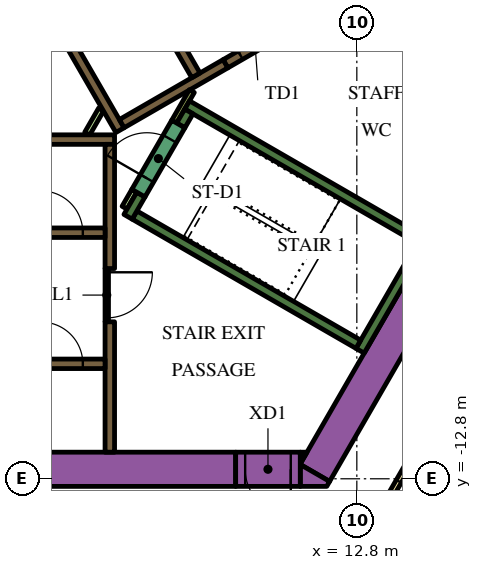
"""IFC4 building model, lengths in metres.
Left out: names, types, materials, properties, quantities, classifications, styles, units other than length and angle.
Written with IfcOpenShell. Run it as: python <this file> out.ifc"""

import sys

from ifc_helpers import new_model, si_unit, direction, frame, frame_2d, origin, place, context, subcontext, project, spatial, polyline, rectangle, outline, extrude, element, fill, save


model = new_model("IFC4")
c1 = context("Model", 3, precision=1e-05, world=origin(), true_north=direction((0.0, 1.0)))
c2 = subcontext(c1, "Body", "Model", "MODEL_VIEW")
j1 = project(units=[si_unit("LENGTHUNIT", "METRE"), si_unit("PLANEANGLEUNIT", "RADIAN")], contexts=[c1])
p1 = place(None, origin())
s1 = spatial("IfcSite", under=j1, at=p1, CompositionType="ELEMENT")
p2 = place(p1, origin())
s2 = spatial("IfcBuilding", under=s1, at=p2, CompositionType="ELEMENT")
p3 = place(p2, frame((0.0, 0.0, 39.3)))
s3 = spatial("IfcBuildingStorey", under=s2, at=p3, CompositionType="ELEMENT", Elevation=39.3)
p4 = place(p3, frame((6.711, 13.476, 0.0), z_axis=(0.0, 0.0, 1.0), x_axis=(0.500002723396, -0.866023831425, 0.0)))
e1 = element("IfcWall", 1, at=p4, inside=s3, PredefinedType="SOLIDWALL", context=c2, shape_type="SweptSolid", body=[
    extrude(rectangle(XDim=20.334, YDim=0.9, at=frame_2d((10.167, 0.0))), origin(), (0.0, 0.0, 1.0), 3.9),
])
p5 = place(p3, frame((11.695, -12.644, 0.0), z_axis=(0.0, 0.0, 1.0), x_axis=(0.500010229568, 0.86601949766, 0.0)))
e2 = element("IfcWall", 2, at=p5, inside=s3, PredefinedType="SOLIDWALL", context=c2, shape_type="SweptSolid", body=[
    extrude(rectangle(XDim=9.326, YDim=0.9, at=frame_2d((4.663, 0.0))), origin(), (0.0, 0.0, 1.0), 3.9),
])
p6 = place(p3, origin())
e3 = element("IfcWall", 3, at=p6, inside=s3, PredefinedType="SOLIDWALL", context=c2, shape_type="SweptSolid", body=[
    extrude(outline(polyline([(12.009, -13.0), (11.312, -13.0), (11.312, -12.425), (12.083, -12.871), (12.009, -13.0)])), origin(), (0.0, 0.0, 1.0), 3.9),
])
e4 = element("IfcWall", 4, at=p6, inside=s3, PredefinedType="SOLIDWALL", context=c2, shape_type="SweptSolid", body=[
    extrude(outline(polyline([(11.489, -12.1), (11.312, -12.407), (11.312, -12.1), (11.489, -12.1)])), origin(), (0.0, 0.0, 1.0), 3.9),
])
p7 = place(p3, frame((-12.019, -12.55, 0.0), z_axis=(0.0, 0.0, 1.0), x_axis=(1.0, 0.0, 0.0)))
e5 = element("IfcWall", 5, at=p7, inside=s3, PredefinedType="SOLIDWALL", context=c2, shape_type="SweptSolid", body=[
    extrude(rectangle(XDim=21.63, YDim=0.9, at=frame_2d((10.815, 0.0))), origin(), (0.0, 0.0, 1.0), 3.9),
])
p8 = place(p3, frame((12.885, -9.431, 0.0), z_axis=(0.0, 0.0, 1.0), x_axis=(0.500020560727, 0.866013532718, 0.0)))
e6 = element("IfcWall", 6, at=p8, inside=s3, PredefinedType="SOLIDWALL", context=c2, shape_type="SweptSolid", body=[
    extrude(rectangle(XDim=3.45, YDim=0.25, at=frame_2d((1.725, 0.0))), origin(), (0.0, 0.0, 1.0), 3.9),
])
p9 = place(p3, frame((12.84, -9.261, 0.0), z_axis=(0.0, 0.0, 1.0), x_axis=(-0.866013990052, 0.500019768644, 0.0)))
e7 = element("IfcWall", 7, at=p9, inside=s3, PredefinedType="SOLIDWALL", context=c2, shape_type="SweptSolid", body=[
    extrude(rectangle(XDim=6.8, YDim=0.25, at=frame_2d((3.4, 0.0))), origin(), (0.0, 0.0, 1.0), 3.9),
])
p10 = place(p3, frame((6.78, -5.906, 0.0), z_axis=(0.0, 0.0, 1.0), x_axis=(0.500223362819, 0.865896406789, 0.0)))
e8 = element("IfcWall", 8, at=p10, inside=s3, PredefinedType="SOLIDWALL", context=c2, shape_type="SweptSolid", body=[
    extrude(rectangle(XDim=0.675, YDim=0.25, at=frame_2d((0.337, 0.0))), origin(), (0.0, 0.0, 1.0), 3.9),
])
p11 = place(p3, frame((8.334, -2.964, 0.0), z_axis=(0.0, 0.0, 1.0), x_axis=(0.866016039709, -0.500016218704, 0.0)))
e9 = element("IfcWall", 9, at=p11, inside=s3, PredefinedType="SOLIDWALL", context=c2, shape_type="SweptSolid", body=[
    extrude(rectangle(XDim=7.05, YDim=0.25, at=frame_2d((3.525, 0.0))), origin(), (0.0, 0.0, 1.0), 3.9),
])
p12 = place(p3, frame((8.168, -3.503, 0.0), z_axis=(0.0, 0.0, 1.0), x_axis=(0.49972245349, 0.866185586049, 0.0)))
e10 = element("IfcWall", 10, at=p12, inside=s3, PredefinedType="SOLIDWALL", context=c2, shape_type="SweptSolid", body=[
    extrude(rectangle(XDim=0.425, YDim=0.25, at=frame_2d((0.212, 0.0))), origin(), (0.0, 0.0, 1.0), 3.9),
])
p13 = place(p3, frame((-5.545, -3.875, 0.0), z_axis=(0.0, 0.0, 1.0), x_axis=(1.0, 0.0, 0.0)))
e11 = element("IfcWall", 11, at=p13, inside=s3, PredefinedType="SOLIDWALL", context=c2, shape_type="SweptSolid", body=[
    extrude(rectangle(XDim=11.97, YDim=0.25, at=frame_2d((5.985, 0.0))), origin(), (0.0, 0.0, 1.0), 3.9),
])
p14 = place(p3, frame((6.3, -8.67, 0.0), z_axis=(0.0, 0.0, 1.0), x_axis=(0.0, -1.0, 0.0)))
e12 = element("IfcWall", 12, at=p14, inside=s3, PredefinedType="SOLIDWALL", context=c2, shape_type="SweptSolid", body=[
    extrude(rectangle(XDim=3.43, YDim=0.25, at=frame_2d((1.715, 0.0))), origin(), (0.0, 0.0, 1.0), 3.9),
])
p15 = place(p3, frame((6.3, -7.268, 0.0), z_axis=(0.0, 0.0, 1.0), x_axis=(0.0, 1.0, 0.0)))
e13 = element("IfcWall", 13, at=p15, inside=s3, PredefinedType="SOLIDWALL", context=c2, shape_type="SweptSolid", body=[
    extrude(rectangle(XDim=3.268, YDim=0.25, at=frame_2d((1.634, 0.0))), origin(), (0.0, 0.0, 1.0), 3.9),
])
e14 = element("IfcWall", 14, at=p6, inside=s3, PredefinedType="SOLIDWALL", context=c2, shape_type="SweptSolid", body=[
    extrude(outline(polyline([(0.566, 6.725), (0.566, 6.875), (0.566, 6.875), (0.565, 6.875), (0.361, 6.875), (0.035, 7.439), (0.252, 7.564), (0.377, 7.348), (6.552, -3.348), (6.677, -3.564), (6.46, -3.689), (0.448, 6.725), (0.565, 6.725), (0.566, 6.725), (0.566, 6.725)])), origin(), (0.0, 0.0, 1.0), 3.9),
])
p16 = place(p3, frame((6.614, -3.456, 0.0), z_axis=(0.0, 0.0, 1.0), x_axis=(0.86602447079, 0.500001615989, 0.0)))
e15 = element("IfcWall", 15, at=p16, inside=s3, PredefinedType="SOLIDWALL", context=c2, shape_type="SweptSolid", body=[
    extrude(rectangle(XDim=3.154, YDim=0.25, at=frame_2d((1.577, 0.0))), origin(), (0.0, 0.0, 1.0), 3.9),
])
p17 = place(p3, frame((6.945, -5.222, 0.0), z_axis=(0.0, 0.0, 1.0), x_axis=(-0.499818422106, -0.866130212453, 0.0)))
e16 = element("IfcWall", 16, at=p17, inside=s3, PredefinedType="PARTITIONING", context=c2, shape_type="SweptSolid", body=[
    extrude(rectangle(XDim=0.514, YDim=0.15, at=frame_2d((0.257, 0.0))), origin(), (0.0, 0.0, 1.0), 2.75),
])
p18 = place(p3, frame((5.705, -3.718, 0.0), z_axis=(0.0, 0.0, 1.0), x_axis=(0.499962090823, 0.866047289552, 0.0)))
e17 = element("IfcWall", 17, at=p18, inside=s3, PredefinedType="PARTITIONING", context=c2, shape_type="SweptSolid", body=[
    extrude(rectangle(XDim=0.735, YDim=0.15, at=frame_2d((0.367, 0.0))), origin(), (0.0, 0.0, 1.0), 2.75),
])
p19 = place(p3, frame((8.459, -2.599, 0.0), z_axis=(0.0, 0.0, 1.0), x_axis=(-0.500041054325, -0.866001699761, 0.0)))
e18 = element("IfcWall", 18, at=p19, inside=s3, PredefinedType="PARTITIONING", context=c2, shape_type="SweptSolid", body=[
    extrude(rectangle(XDim=0.929, YDim=0.15, at=frame_2d((0.464, 0.0))), origin(), (0.0, 0.0, 1.0), 3.9),
])
p20 = place(p3, frame((-6.175, -9.775, 0.0), z_axis=(0.0, 0.0, 1.0), x_axis=(1.0, 0.0, 0.0)))
e19 = element("IfcWall", 19, at=p20, inside=s3, PredefinedType="SOLIDWALL", context=c2, shape_type="SweptSolid", body=[
    extrude(rectangle(XDim=12.35, YDim=0.25, at=frame_2d((6.175, 0.0))), origin(), (0.0, 0.0, 1.0), 3.9),
])
p21 = place(p20, frame((0.585, 0.0, 0.0)))
e20 = element("IfcOpeningElement", 20, at=p21, cuts=e19, PredefinedType="OPENING", context=c2, shape_type="SweptSolid", body=[
    extrude(rectangle(XDim=1.1, YDim=2.1, at=frame_2d((0.55, 1.05))), frame((0.0, 0.135, 0.0), z_axis=(0.0, -1.0, 0.0), x_axis=(1.0, 0.0, 0.0)), (0.0, 0.0, 1.0), 0.27),
])
p22 = place(p20, frame((3.105, 0.0, 0.0)))
e21 = element("IfcOpeningElement", 21, at=p22, cuts=e19, PredefinedType="OPENING", context=c2, shape_type="SweptSolid", body=[
    extrude(rectangle(XDim=1.1, YDim=2.1, at=frame_2d((0.55, 1.05))), frame((0.0, 0.135, 0.0), z_axis=(0.0, -1.0, 0.0), x_axis=(1.0, 0.0, 0.0)), (0.0, 0.0, 1.0), 0.27),
])
p23 = place(p20, frame((5.625, 0.0, 0.0)))
e22 = element("IfcOpeningElement", 22, at=p23, cuts=e19, PredefinedType="OPENING", context=c2, shape_type="SweptSolid", body=[
    extrude(rectangle(XDim=1.1, YDim=2.1, at=frame_2d((0.55, 1.05))), frame((0.0, 0.135, 0.0), z_axis=(0.0, -1.0, 0.0), x_axis=(1.0, 0.0, 0.0)), (0.0, 0.0, 1.0), 0.27),
])
p24 = place(p20, frame((8.145, 0.0, 0.0)))
e23 = element("IfcOpeningElement", 23, at=p24, cuts=e19, PredefinedType="OPENING", context=c2, shape_type="SweptSolid", body=[
    extrude(rectangle(XDim=1.1, YDim=2.1, at=frame_2d((0.55, 1.05))), frame((0.0, 0.135, 0.0), z_axis=(0.0, -1.0, 0.0), x_axis=(1.0, 0.0, 0.0)), (0.0, 0.0, 1.0), 0.27),
])
p25 = place(p20, frame((10.665, 0.0, 0.0)))
e24 = element("IfcOpeningElement", 24, at=p25, cuts=e19, PredefinedType="OPENING", context=c2, shape_type="SweptSolid", body=[
    extrude(rectangle(XDim=1.1, YDim=2.1, at=frame_2d((0.55, 1.05))), frame((0.0, 0.135, 0.0), z_axis=(0.0, -1.0, 0.0), x_axis=(1.0, 0.0, 0.0)), (0.0, 0.0, 1.0), 0.27),
])
p26 = place(p3, frame((-6.175, -6.325, 0.0), z_axis=(0.0, 0.0, 1.0), x_axis=(1.0, 0.0, 0.0)))
e25 = element("IfcWall", 25, at=p26, inside=s3, PredefinedType="SOLIDWALL", context=c2, shape_type="SweptSolid", body=[
    extrude(rectangle(XDim=12.35, YDim=0.25, at=frame_2d((6.175, 0.0))), origin(), (0.0, 0.0, 1.0), 3.9),
])
p27 = place(p26, frame((3.205, 0.0, 0.0)))
e26 = element("IfcOpeningElement", 26, at=p27, cuts=e25, PredefinedType="OPENING", context=c2, shape_type="SweptSolid", body=[
    extrude(rectangle(XDim=0.9, YDim=2.1, at=frame_2d((0.45, 1.05))), frame((0.0, 0.135, 0.0), z_axis=(0.0, -1.0, 0.0), x_axis=(1.0, 0.0, 0.0)), (0.0, 0.0, 1.0), 0.27),
])
p28 = place(p26, frame((8.145, 0.0, 0.0)))
e27 = element("IfcOpeningElement", 27, at=p28, cuts=e25, PredefinedType="OPENING", context=c2, shape_type="SweptSolid", body=[
    extrude(rectangle(XDim=1.1, YDim=2.1, at=frame_2d((0.55, 1.05))), frame((0.0, 0.135, 0.0), z_axis=(0.0, -1.0, 0.0), x_axis=(1.0, 0.0, 0.0)), (0.0, 0.0, 1.0), 0.27),
])
p29 = place(p26, frame((10.665, 0.0, 0.0)))
e28 = element("IfcOpeningElement", 28, at=p29, cuts=e25, PredefinedType="OPENING", context=c2, shape_type="SweptSolid", body=[
    extrude(rectangle(XDim=1.1, YDim=2.1, at=frame_2d((0.55, 1.05))), frame((0.0, 0.135, 0.0), z_axis=(0.0, -1.0, 0.0), x_axis=(1.0, 0.0, 0.0)), (0.0, 0.0, 1.0), 0.27),
])
p30 = place(p3, frame((8.565, -2.185, 0.0), z_axis=(0.0, 0.0, 1.0), x_axis=(-0.499997954832, 0.866026584559, 0.0)))
e29 = element("IfcWall", 29, at=p30, inside=s3, PredefinedType="SOLIDWALL", context=c2, shape_type="SweptSolid", body=[
    extrude(rectangle(XDim=12.35, YDim=0.25, at=frame_2d((6.175, 0.0))), origin(), (0.0, 0.0, 1.0), 3.9),
])
p31 = place(p30, frame((5.725, 0.0, 0.0)))
e30 = element("IfcOpeningElement", 30, at=p31, cuts=e29, PredefinedType="OPENING", context=c2, shape_type="SweptSolid", body=[
    extrude(rectangle(XDim=0.9, YDim=2.1, at=frame_2d((0.45, 1.05))), frame((0.0, 0.135, 0.0), z_axis=(0.0, -1.0, 0.0), x_axis=(1.0, 0.0, 0.0)), (0.0, 0.0, 1.0), 0.27),
])
p32 = place(p3, frame((7.053, -5.284, 0.0), z_axis=(0.0, 0.0, 1.0), x_axis=(0.500078061341, 0.865980330357, 0.0)))
e31 = element("IfcWall", 31, at=p32, inside=s3, PredefinedType="SOLIDWALL", context=c2, shape_type="SweptSolid", body=[
    extrude(rectangle(XDim=2.1, YDim=0.4, at=frame_2d((1.05, 0.0))), origin(), (0.0, 0.0, 1.0), 3.9),
])
p33 = place(p32, frame((0.45, 0.0, 0.0)))
e32 = element("IfcOpeningElement", 32, at=p33, cuts=e31, PredefinedType="OPENING", context=c2, shape_type="SweptSolid", body=[
    extrude(rectangle(XDim=1.2, YDim=2.1, at=frame_2d((0.6, 1.05))), frame((0.0, 0.21, 0.0), z_axis=(0.0, -1.0, 0.0), x_axis=(1.0, 0.0, 0.0)), (0.0, 0.0, 1.0), 0.42),
])
p34 = place(p3, frame((9.346, -1.879, 0.0), z_axis=(0.0, 0.0, 1.0), x_axis=(0.866047807691, 0.499961193289, 0.0)))
e33 = element("IfcWall", 33, at=p34, inside=s3, PredefinedType="SOLIDWALL", context=c2, shape_type="SweptSolid", body=[
    extrude(rectangle(XDim=1.8, YDim=0.25, at=frame_2d((0.9, 0.0))), origin(), (0.0, 0.0, 1.0), 3.9),
])
p35 = place(p34, frame((0.45, 0.0, 0.0)))
e34 = element("IfcOpeningElement", 34, at=p35, cuts=e33, PredefinedType="OPENING", context=c2, shape_type="SweptSolid", body=[
    extrude(rectangle(XDim=0.9, YDim=2.1, at=frame_2d((0.45, 1.05))), frame((0.0, 0.135, 0.0), z_axis=(0.0, -1.0, 0.0), x_axis=(1.0, 0.0, 0.0)), (0.0, 0.0, 1.0), 0.27),
])
p36 = place(p3, frame((6.22, -7.266, 0.0), z_axis=(0.0, 0.0, 1.0), x_axis=(0.0, -1.0, 0.0)))
e35 = element("IfcWall", 35, at=p36, inside=s3, PredefinedType="PARTITIONING", context=c2, shape_type="SweptSolid", body=[
    extrude(rectangle(XDim=1.4, YDim=0.09, at=frame_2d((0.7, 0.0))), origin(), (0.0, 0.0, 1.0), 2.75),
])
p37 = place(p36, frame((0.1, 0.0, 0.0)))
e36 = element("IfcOpeningElement", 36, at=p37, cuts=e35, PredefinedType="OPENING", context=c2, shape_type="SweptSolid", body=[
    extrude(rectangle(XDim=1.2, YDim=2.1, at=frame_2d((0.6, 1.05))), frame((0.0, 0.055, 0.0), z_axis=(0.0, -1.0, 0.0), x_axis=(1.0, 0.0, 0.0)), (0.0, 0.0, 1.0), 0.11),
])
p38 = place(p3, frame((11.312, -12.55, 0.0), z_axis=(0.0, 0.0, 1.0), x_axis=(-1.0, 0.0, 0.0)))
e37 = element("IfcWall", 37, at=p38, inside=s3, PredefinedType="SOLIDWALL", context=c2, shape_type="SweptSolid", body=[
    extrude(rectangle(XDim=1.7, YDim=0.9, at=frame_2d((0.85, 0.0))), origin(), (0.0, 0.0, 1.0), 3.9),
])
p39 = place(p38, frame((0.25, 0.0, 0.0)))
e38 = element("IfcOpeningElement", 38, at=p39, cuts=e37, PredefinedType="OPENING", context=c2, shape_type="SweptSolid", body=[
    extrude(rectangle(XDim=1.2, YDim=2.1, at=frame_2d((0.6, 1.05))), frame((0.0, 0.46, 0.0), z_axis=(0.0, -1.0, 0.0), x_axis=(1.0, 0.0, 0.0)), (0.0, 0.0, 1.0), 0.92),
])
p40 = place(p3, frame((6.163, 18.475, 0.0), z_axis=(0.0, 0.0, 1.0), x_axis=(0.500001317485, -0.866024643133, 0.0)))
e39 = element("IfcWall", 39, at=p40, inside=s3, PredefinedType="PARTITIONING", context=c2, shape_type="SweptSolid", body=[
    extrude(rectangle(XDim=25.767, YDim=0.15, at=frame_2d((12.883, 0.0))), origin(), (0.0, 0.0, 1.0), 2.75),
])
p41 = place(p40, frame((24.586, 0.0, 0.0)))
e40 = element("IfcOpeningElement", 40, at=p41, cuts=e39, PredefinedType="OPENING", context=c2, shape_type="SweptSolid", body=[
    extrude(rectangle(XDim=1.0, YDim=2.1, at=frame_2d((0.5, 1.05))), frame((0.0, 0.085, 0.0), z_axis=(0.0, -1.0, 0.0), x_axis=(1.0, 0.0, 0.0)), (0.0, 0.0, 1.0), 0.17),
])
p42 = place(p40, frame((16.196, 0.0, 0.0)))
e41 = element("IfcOpeningElement", 41, at=p42, cuts=e39, PredefinedType="OPENING", context=c2, shape_type="SweptSolid", body=[
    extrude(rectangle(XDim=1.0, YDim=2.1, at=frame_2d((0.5, 1.05))), frame((0.0, 0.085, 0.0), z_axis=(0.0, -1.0, 0.0), x_axis=(1.0, 0.0, 0.0)), (0.0, 0.0, 1.0), 0.17),
])
p43 = place(p40, frame((14.789, 0.0, 0.0)))
e42 = element("IfcOpeningElement", 42, at=p43, cuts=e39, PredefinedType="OPENING", context=c2, shape_type="SweptSolid", body=[
    extrude(rectangle(XDim=1.1, YDim=2.1, at=frame_2d((0.55, 1.05))), frame((0.0, 0.085, 0.0), z_axis=(0.0, -1.0, 0.0), x_axis=(1.0, 0.0, 0.0)), (0.0, 0.0, 1.0), 0.17),
])
p44 = place(p40, frame((3.698, 0.0, 0.0)))
e43 = element("IfcOpeningElement", 43, at=p44, cuts=e39, PredefinedType="OPENING", context=c2, shape_type="SweptSolid", body=[
    extrude(rectangle(XDim=1.0, YDim=2.1, at=frame_2d((0.5, 1.05))), frame((0.0, 0.085, 0.0), z_axis=(0.0, -1.0, 0.0), x_axis=(1.0, 0.0, 0.0)), (0.0, 0.0, 1.0), 0.17),
])
p45 = place(p40, frame((2.391, 0.0, 0.0)))
e44 = element("IfcOpeningElement", 44, at=p45, cuts=e39, PredefinedType="OPENING", context=c2, shape_type="SweptSolid", body=[
    extrude(rectangle(XDim=1.0, YDim=2.1, at=frame_2d((0.5, 1.05))), frame((0.0, 0.085, 0.0), z_axis=(0.0, -1.0, 0.0), x_axis=(1.0, 0.0, 0.0)), (0.0, 0.0, 1.0), 0.17),
])
p46 = place(p3, frame((15.587, -9.952, 0.0), z_axis=(0.0, 0.0, 1.0), x_axis=(-0.500016618951, -0.866015808616, 0.0)))
e45 = element("IfcWall", 45, at=p46, inside=s3, PredefinedType="PARTITIONING", context=c2, shape_type="SweptSolid", body=[
    extrude(rectangle(XDim=5.268, YDim=0.15, at=frame_2d((2.634, 0.0))), origin(), (0.0, 0.0, 1.0), 2.75),
])
p47 = place(p46, frame((2.465, 0.0, 0.0)))
e46 = element("IfcOpeningElement", 46, at=p47, cuts=e45, PredefinedType="OPENING", context=c2, shape_type="SweptSolid", body=[
    extrude(rectangle(XDim=0.9, YDim=2.1, at=frame_2d((0.45, 1.05))), frame((0.0, 0.085, 0.0), z_axis=(0.0, -1.0, 0.0), x_axis=(1.0, 0.0, 0.0)), (0.0, 0.0, 1.0), 0.17),
])
p48 = place(p25, origin())
e47 = element("IfcDoor", 47, at=p48, inside=s3, OperationType="DOUBLE_DOOR_SLIDING", PredefinedType="DOOR", context=c2, shape_type="SweptSolid", body=[
    extrude(rectangle(XDim=1.1, YDim=2.1, at=frame_2d((0.55, 1.05))), frame((0.0, 0.025, 0.0), z_axis=(0.0, -1.0, 0.0), x_axis=(1.0, 0.0, 0.0)), (0.0, 0.0, 1.0), 0.05),
])
fill(e24, e47)
p49 = place(p29, origin())
e48 = element("IfcDoor", 48, at=p49, inside=s3, OperationType="DOUBLE_DOOR_SLIDING", PredefinedType="DOOR", context=c2, shape_type="SweptSolid", body=[
    extrude(rectangle(XDim=1.1, YDim=2.1, at=frame_2d((0.55, 1.05))), frame((0.0, 0.025, 0.0), z_axis=(0.0, -1.0, 0.0), x_axis=(1.0, 0.0, 0.0)), (0.0, 0.0, 1.0), 0.05),
])
fill(e28, e48)
p50 = place(p33, origin())
e49 = element("IfcDoor", 49, at=p50, inside=s3, OperationType="SINGLE_SWING_LEFT", PredefinedType="DOOR", context=c2, shape_type="SweptSolid", body=[
    extrude(rectangle(XDim=1.2, YDim=2.1, at=frame_2d((0.6, 1.05))), frame((0.0, 0.025, 0.0), z_axis=(0.0, -1.0, 0.0), x_axis=(1.0, 0.0, 0.0)), (0.0, 0.0, 1.0), 0.05),
])
fill(e32, e49)
p51 = place(p35, origin())
e50 = element("IfcDoor", 50, at=p51, inside=s3, OperationType="SINGLE_SWING_LEFT", PredefinedType="DOOR", context=c2, shape_type="SweptSolid", body=[
    extrude(rectangle(XDim=0.9, YDim=2.1, at=frame_2d((0.45, 1.05))), frame((0.0, 0.025, 0.0), z_axis=(0.0, -1.0, 0.0), x_axis=(1.0, 0.0, 0.0)), (0.0, 0.0, 1.0), 0.05),
])
fill(e34, e50)
p52 = place(p37, origin())
e51 = element("IfcDoor", 51, at=p52, inside=s3, OperationType="SINGLE_SWING_LEFT", PredefinedType="DOOR", context=c2, shape_type="SweptSolid", body=[
    extrude(rectangle(XDim=1.2, YDim=2.1, at=frame_2d((0.6, 1.05))), frame((0.0, 0.025, 0.0), z_axis=(0.0, -1.0, 0.0), x_axis=(1.0, 0.0, 0.0)), (0.0, 0.0, 1.0), 0.05),
])
fill(e36, e51)
p53 = place(p39, origin())
e52 = element("IfcDoor", 52, at=p53, inside=s3, OperationType="SINGLE_SWING_LEFT", PredefinedType="DOOR", context=c2, shape_type="SweptSolid", body=[
    extrude(rectangle(XDim=1.2, YDim=2.1, at=frame_2d((0.6, 1.05))), frame((0.0, 0.025, 0.0), z_axis=(0.0, -1.0, 0.0), x_axis=(1.0, 0.0, 0.0)), (0.0, 0.0, 1.0), 0.05),
])
fill(e38, e52)
p54 = place(p47, origin())
e53 = element("IfcDoor", 53, at=p54, inside=s3, OperationType="SINGLE_SWING_LEFT", PredefinedType="DOOR", context=c2, shape_type="SweptSolid", body=[
    extrude(rectangle(XDim=0.9, YDim=2.1, at=frame_2d((0.45, 1.05))), frame((0.0, 0.025, 0.0), z_axis=(0.0, -1.0, 0.0), x_axis=(1.0, 0.0, 0.0)), (0.0, 0.0, 1.0), 0.05),
])
fill(e46, e53)
save(model, sys.argv[1])
